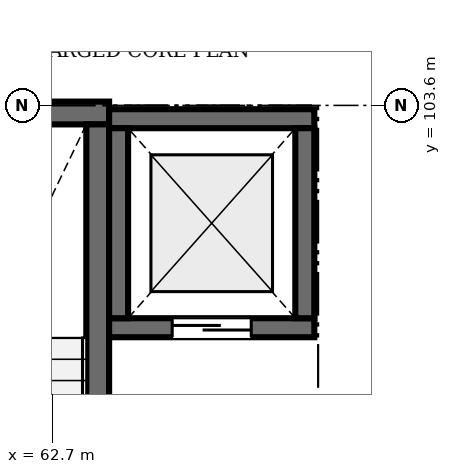
"""IFC4 building model, lengths in metres.
Left out: names, types, materials, properties, quantities, classifications, styles, units other than length and angle.
Written with IfcOpenShell. Run it as: python <this file> out.ifc"""

import sys

from ifc_helpers import new_model, si_unit, direction, frame, frame_2d, origin, place, context, subcontext, project, spatial, rectangle, extrude, element, fill, save


model = new_model("IFC4")
c1 = context("Model", 3, precision=1e-05, world=origin(), true_north=direction((0.0, 1.0)))
c2 = subcontext(c1, "Body", "Model", "MODEL_VIEW")
j1 = project(units=[si_unit("LENGTHUNIT", "METRE"), si_unit("PLANEANGLEUNIT", "RADIAN")], contexts=[c1])
p1 = place(None, origin())
s1 = spatial("IfcSite", under=j1, at=p1, CompositionType="ELEMENT")
p2 = place(p1, origin())
s2 = spatial("IfcBuilding", under=s1, at=p2, CompositionType="ELEMENT")
p3 = place(p2, frame((0.0, 0.0, 10.2)))
s3 = spatial("IfcBuildingStorey", under=s2, at=p3, CompositionType="ELEMENT", Elevation=10.2)
p4 = place(p3, frame((59.75, 103.5, 0.0), z_axis=(0.0, 0.0, 1.0), x_axis=(1.0, 0.0, 0.0)))
e1 = element("IfcWall", 1, at=p4, inside=s3, PredefinedType="SHEAR", context=c2, shape_type="SweptSolid", body=[
    extrude(rectangle(XDim=3.7, YDim=0.3, at=frame_2d((1.85, 0.0))), origin(), (0.0, 0.0, 1.0), 4.26),
])
p5 = place(p3, frame((63.3, 95.45, 0.0), z_axis=(0.0, 0.0, 1.0), x_axis=(0.0, 1.0, 0.0)))
e2 = element("IfcWall", 2, at=p5, inside=s3, PredefinedType="SHEAR", context=c2, shape_type="SweptSolid", body=[
    extrude(rectangle(XDim=7.9, YDim=0.3, at=frame_2d((3.95, 0.0))), origin(), (0.0, 0.0, 1.0), 4.26),
])
p6 = place(p3, frame((63.45, 100.675, 0.0), z_axis=(0.0, 0.0, 1.0), x_axis=(1.0, 0.0, 0.0)))
e3 = element("IfcWall", 3, at=p6, inside=s3, PredefinedType="SHEAR", context=c2, shape_type="SweptSolid", body=[
    extrude(rectangle(XDim=2.7, YDim=0.25, at=frame_2d((1.35, 0.0))), origin(), (0.0, 0.0, 1.0), 4.26),
])
p7 = place(p6, frame((0.83, 0.0, 0.0)))
e4 = element("IfcOpeningElement", 4, at=p7, cuts=e3, PredefinedType="OPENING", context=c2, shape_type="SweptSolid", body=[
    extrude(rectangle(XDim=1.04, YDim=2.15, at=frame_2d((0.52, 1.075))), frame((0.0, 0.135, 0.0), z_axis=(0.0, -1.0, 0.0), x_axis=(1.0, 0.0, 0.0)), (0.0, 0.0, 1.0), 0.27),
])
p8 = place(p3, frame((63.45, 103.425, 0.0), z_axis=(0.0, 0.0, 1.0), x_axis=(1.0, 0.0, 0.0)))
e5 = element("IfcWall", 5, at=p8, inside=s3, PredefinedType="SHEAR", context=c2, shape_type="SweptSolid", body=[
    extrude(rectangle(XDim=2.7, YDim=0.25, at=frame_2d((1.35, 0.0))), origin(), (0.0, 0.0, 1.0), 4.26),
])
for number, where, z_axis, x_axis in (
    (6, (63.575, 100.8, 0.0), (0.0, 0.0, 1.0), (0.0, 1.0, 0.0)),
    (7, (66.025, 100.8, 0.0), (0.0, 0.0, 1.0), (0.0, 1.0, 0.0)),
):
    element("IfcWall", number, at=place(p3, frame(where, z_axis=z_axis, x_axis=x_axis)), inside=s3, PredefinedType="SHEAR", context=c2, shape_type="SweptSolid", body=[
        extrude(rectangle(XDim=2.5, YDim=0.25, at=frame_2d((1.25, 0.0))), origin(), (0.0, 0.0, 1.0), 4.26),
    ])
p9 = place(p7, origin())
e8 = element("IfcDoor", 8, at=p9, inside=s3, OperationType="SLIDING_TO_LEFT", PredefinedType="DOOR", context=c2, shape_type="SweptSolid", body=[
    extrude(rectangle(XDim=1.04, YDim=2.15, at=frame_2d((0.52, 1.075))), frame((0.0, 0.025, 0.0), z_axis=(0.0, -1.0, 0.0), x_axis=(1.0, 0.0, 0.0)), (0.0, 0.0, 1.0), 0.05),
])
fill(e4, e8)
save(model, sys.argv[1])
